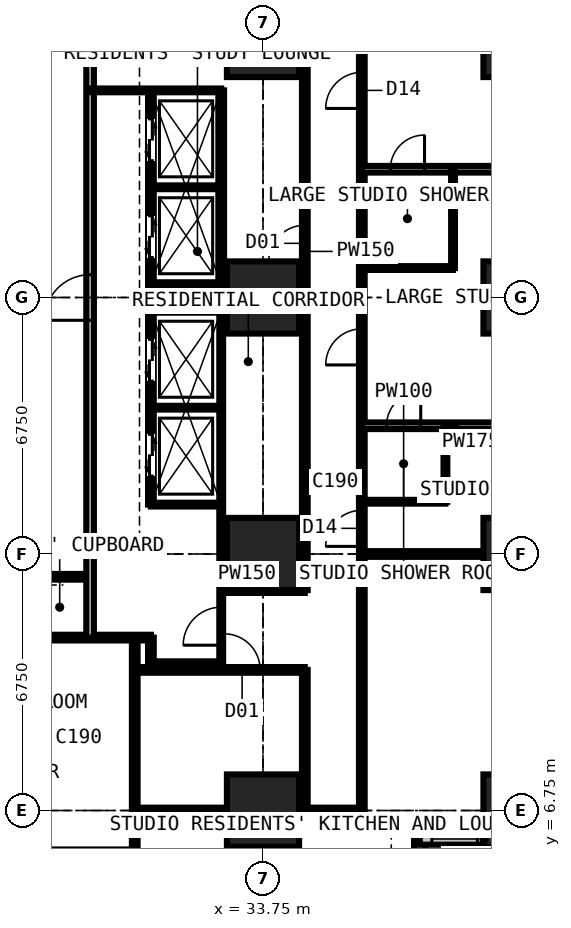
"""IFC4 building model, lengths in metres.
Left out: names, types, materials, properties, quantities, classifications, styles, units other than length and angle.
Written with IfcOpenShell. Run it as: python <this file> out.ifc"""

import sys

from ifc_helpers import new_model, si_unit, direction, frame, frame_2d, origin, origin_2d, place, context, subcontext, project, spatial, rectangle, extrude, element, fill, save


model = new_model("IFC4")
c1 = context("Model", 3, precision=1e-05, world=origin(), true_north=direction((0.0, 1.0)))
c2 = subcontext(c1, "Body", "Model", "MODEL_VIEW")
j1 = project(units=[si_unit("LENGTHUNIT", "METRE"), si_unit("PLANEANGLEUNIT", "RADIAN")], contexts=[c1])
p1 = place(None, origin())
s1 = spatial("IfcSite", under=j1, at=p1, CompositionType="ELEMENT")
p2 = place(p1, origin())
s2 = spatial("IfcBuilding", under=s1, at=p2, CompositionType="ELEMENT")
p3 = place(p2, frame((0.0, 0.0, 18.0)))
s3 = spatial("IfcBuildingStorey", under=s2, at=p3, CompositionType="ELEMENT", Elevation=18.0)
for number, where, z_axis, x_axis in (
    (1, (33.75, 6.75, 0.0), (0.0, 0.0, 1.0), (1.0, 0.0, 0.0)),
    (2, (33.75, 13.5, 0.0), (0.0, 0.0, 1.0), (1.0, 0.0, 0.0)),
    (3, (33.75, 20.25, 0.0), (0.0, 0.0, 1.0), (1.0, 0.0, 0.0)),
    (4, (33.75, 27.0, 0.0), (0.0, 0.0, 1.0), (1.0, 0.0, 0.0)),
    (5, (40.5, 6.75, 0.0), (0.0, 0.0, 1.0), (1.0, 0.0, 0.0)),
    (6, (40.5, 13.5, 0.0), (0.0, 0.0, 1.0), (1.0, 0.0, 0.0)),
    (7, (40.5, 20.25, 0.0), (0.0, 0.0, 1.0), (1.0, 0.0, 0.0)),
    (8, (40.5, 27.0, 0.0), (0.0, 0.0, 1.0), (1.0, 0.0, 0.0)),
):
    element("IfcColumn", number, at=place(p3, frame(where, z_axis=z_axis, x_axis=x_axis)), inside=s3, PredefinedType="COLUMN", context=c2, shape_type="SweptSolid", body=[
        extrude(rectangle(XDim=1.9, YDim=1.9, at=origin_2d()), origin(), (0.0, 0.0, 1.0), 3.6),
    ])
p4 = place(p3, frame((37.875, 2.625, 0.0), z_axis=(0.0, 0.0, 1.0), x_axis=(0.0, 1.0, 0.0)))
e9 = element("IfcWall", 9, at=p4, inside=s3, PredefinedType="SOLIDWALL", context=c2, shape_type="SweptSolid", body=[
    extrude(rectangle(XDim=3.375, YDim=0.3, at=frame_2d((1.688, 0.0))), origin(), (0.0, 0.0, 1.0), 3.375),
])
p5 = place(p4, frame((0.788, 0.0, 0.6)))
e10 = element("IfcOpeningElement", 10, at=p5, cuts=e9, PredefinedType="OPENING", context=c2, shape_type="SweptSolid", body=[
    extrude(rectangle(XDim=1.8, YDim=2.1, at=frame_2d((0.9, 1.05))), frame((0.0, 0.16, 0.0), z_axis=(0.0, -1.0, 0.0), x_axis=(1.0, 0.0, 0.0)), (0.0, 0.0, 1.0), 0.32),
])
p6 = place(p3, frame((37.875, 6.0, 0.0), z_axis=(0.0, 0.0, 1.0), x_axis=(1.0, 0.0, 0.0)))
e11 = element("IfcWall", 11, at=p6, inside=s3, PredefinedType="SOLIDWALL", context=c2, shape_type="SweptSolid", body=[
    extrude(rectangle(XDim=3.375, YDim=0.3, at=frame_2d((1.688, 0.0))), origin(), (0.0, 0.0, 1.0), 3.375),
])
p7 = place(p6, frame((0.317, 0.0, 0.9)))
e12 = element("IfcOpeningElement", 12, at=p7, cuts=e11, PredefinedType="OPENING", context=c2, shape_type="SweptSolid", body=[
    extrude(rectangle(XDim=1.2, YDim=1.8, at=frame_2d((0.6, 0.9))), frame((0.0, 0.16, 0.0), z_axis=(0.0, -1.0, 0.0), x_axis=(1.0, 0.0, 0.0)), (0.0, 0.0, 1.0), 0.32),
])
p8 = place(p3, frame((10.125, 11.3, 0.0), z_axis=(0.0, 0.0, 1.0), x_axis=(1.0, 0.0, 0.0)))
e13 = element("IfcWall", 13, at=p8, inside=s3, PredefinedType="PARTITIONING", context=c2, shape_type="SweptSolid", body=[
    extrude(rectangle(XDim=20.675, YDim=0.15, at=frame_2d((10.337, 0.0))), origin(), (0.0, 0.0, 1.0), 3.375),
])
p9 = place(p8, frame((8.375, 0.0, 0.0)))
e14 = element("IfcOpeningElement", 14, at=p9, cuts=e13, PredefinedType="OPENING", context=c2, shape_type="SweptSolid", body=[
    extrude(rectangle(XDim=1.0, YDim=2.2, at=frame_2d((0.5, 1.1))), frame((0.0, 0.085, 0.0), z_axis=(0.0, -1.0, 0.0), x_axis=(1.0, 0.0, 0.0)), (0.0, 0.0, 1.0), 0.17),
])
p10 = place(p8, frame((10.975, 0.0, 0.0)))
e15 = element("IfcOpeningElement", 15, at=p10, cuts=e13, PredefinedType="OPENING", context=c2, shape_type="SweptSolid", body=[
    extrude(rectangle(XDim=1.0, YDim=2.2, at=frame_2d((0.5, 1.1))), frame((0.0, 0.085, 0.0), z_axis=(0.0, -1.0, 0.0), x_axis=(1.0, 0.0, 0.0)), (0.0, 0.0, 1.0), 0.17),
])
p11 = place(p8, frame((3.925, 0.0, 0.0)))
e16 = element("IfcOpeningElement", 16, at=p11, cuts=e13, PredefinedType="OPENING", context=c2, shape_type="SweptSolid", body=[
    extrude(rectangle(XDim=0.95, YDim=2.2, at=frame_2d((0.475, 1.1))), frame((0.0, 0.085, 0.0), z_axis=(0.0, -1.0, 0.0), x_axis=(1.0, 0.0, 0.0)), (0.0, 0.0, 1.0), 0.17),
])
p12 = place(p3, frame((27.6, 12.9, 0.0), z_axis=(0.0, 0.0, 1.0), x_axis=(1.0, 0.0, 0.0)))
e17 = element("IfcWall", 17, at=p12, inside=s3, PredefinedType="PARTITIONING", context=c2, shape_type="SweptSolid", body=[
    extrude(rectangle(XDim=1.6, YDim=0.15, at=frame_2d((0.8, 0.0))), origin(), (0.0, 0.0, 1.0), 2.877),
])
p13 = place(p3, frame((29.2, 11.3, 0.0), z_axis=(0.0, 0.0, 1.0), x_axis=(0.0, 1.0, 0.0)))
e18 = element("IfcWall", 18, at=p13, inside=s3, PredefinedType="PARTITIONING", context=c2, shape_type="SweptSolid", body=[
    extrude(rectangle(XDim=17.9, YDim=0.2, at=frame_2d((8.95, 0.0))), origin(), (0.0, 0.0, 1.0), 3.375),
])
p14 = place(p13, frame((8.35, 0.0, 0.0)))
e19 = element("IfcOpeningElement", 19, at=p14, cuts=e18, PredefinedType="OPENING", context=c2, shape_type="SweptSolid", body=[
    extrude(rectangle(XDim=1.2, YDim=2.2, at=frame_2d((0.6, 1.1))), frame((0.0, 0.11, 0.0), z_axis=(0.0, -1.0, 0.0), x_axis=(1.0, 0.0, 0.0)), (0.0, 0.0, 1.0), 0.22),
])
p15 = place(p3, frame((29.2, 25.7, 0.0), z_axis=(0.0, 0.0, 1.0), x_axis=(1.0, 0.0, 0.0)))
e20 = element("IfcWall", 20, at=p15, inside=s3, PredefinedType="SHEAR", context=c2, shape_type="SweptSolid", body=[
    extrude(rectangle(XDim=3.45, YDim=0.1, at=frame_2d((1.725, 0.0))), origin(), (0.0, 0.0, 1.0), 3.375),
])
p16 = place(p3, frame((30.375, -0.734, 0.0), z_axis=(0.0, 0.0, 1.0), x_axis=(0.0, 1.0, 0.0)))
e21 = element("IfcWall", 21, at=p16, inside=s3, PredefinedType="PARTITIONING", context=c2, shape_type="SweptSolid", body=[
    extrude(rectangle(XDim=12.034, YDim=0.15, at=frame_2d((6.017, 0.0))), origin(), (0.0, 0.0, 1.0), 3.375),
])
p17 = place(p16, frame((5.134, 0.0, 0.0)))
e22 = element("IfcOpeningElement", 22, at=p17, cuts=e21, PredefinedType="OPENING", context=c2, shape_type="SweptSolid", body=[
    extrude(rectangle(XDim=1.0, YDim=2.2, at=frame_2d((0.5, 1.1))), frame((0.0, 0.085, 0.0), z_axis=(0.0, -1.0, 0.0), x_axis=(1.0, 0.0, 0.0)), (0.0, 0.0, 1.0), 0.17),
])
p18 = place(p3, frame((30.375, 6.75, 0.0), z_axis=(0.0, 0.0, 1.0), x_axis=(1.0, 0.0, 0.0)))
e23 = element("IfcWall", 23, at=p18, inside=s3, PredefinedType="PARTITIONING", context=c2, shape_type="SweptSolid", body=[
    extrude(rectangle(XDim=5.975, YDim=0.15, at=frame_2d((2.988, 0.0))), origin(), (0.0, 0.0, 1.0), 2.877),
])
p19 = place(p3, frame((30.375, 10.45, 0.0), z_axis=(0.0, 0.0, 1.0), x_axis=(1.0, 0.0, 0.0)))
e24 = element("IfcWall", 24, at=p19, inside=s3, PredefinedType="PARTITIONING", context=c2, shape_type="SweptSolid", body=[
    extrude(rectangle(XDim=4.475, YDim=0.15, at=frame_2d((2.238, 0.0))), origin(), (0.0, 0.0, 1.0), 3.375),
])
p20 = place(p19, frame((2.35, 0.0, 0.0)))
e25 = element("IfcOpeningElement", 25, at=p20, cuts=e24, PredefinedType="OPENING", context=c2, shape_type="SweptSolid", body=[
    extrude(rectangle(XDim=0.95, YDim=2.2, at=frame_2d((0.475, 1.1))), frame((0.0, 0.085, 0.0), z_axis=(0.0, -1.0, 0.0), x_axis=(1.0, 0.0, 0.0)), (0.0, 0.0, 1.0), 0.17),
])
p21 = place(p3, frame((30.8, 10.6, 0.0), z_axis=(0.0, 0.0, 1.0), x_axis=(0.0, 1.0, 0.0)))
e26 = element("IfcWall", 26, at=p21, inside=s3, PredefinedType="PARTITIONING", context=c2, shape_type="SweptSolid", body=[
    extrude(rectangle(XDim=0.7, YDim=0.15, at=frame_2d((0.35, 0.0))), origin(), (0.0, 0.0, 1.0), 3.375),
])
p22 = place(p3, frame((30.8, 10.6, 0.0), z_axis=(0.0, 0.0, 1.0), x_axis=(1.0, 0.0, 0.0)))
e27 = element("IfcWall", 27, at=p22, inside=s3, PredefinedType="PARTITIONING", context=c2, shape_type="SweptSolid", body=[
    extrude(rectangle(XDim=1.85, YDim=0.15, at=frame_2d((0.925, 0.0))), origin(), (0.0, 0.0, 1.0), 3.375),
])
p23 = place(p3, frame((30.8, 14.8, 0.0), z_axis=(0.0, 0.0, 1.0), x_axis=(0.0, 1.0, 0.0)))
e28 = element("IfcWall", 28, at=p23, inside=s3, PredefinedType="PARTITIONING", context=c2, shape_type="SweptSolid", body=[
    extrude(rectangle(XDim=10.9, YDim=0.15, at=frame_2d((5.45, 0.0))), origin(), (0.0, 0.0, 1.0), 3.375),
])
p24 = place(p23, frame((0.75, 0.0, 0.0)))
e29 = element("IfcOpeningElement", 29, at=p24, cuts=e28, PredefinedType="OPENING", context=c2, shape_type="SweptSolid", body=[
    extrude(rectangle(XDim=1.1, YDim=2.2, at=frame_2d((0.55, 1.1))), frame((0.0, 0.085, 0.0), z_axis=(0.0, -1.0, 0.0), x_axis=(1.0, 0.0, 0.0)), (0.0, 0.0, 1.0), 0.17),
])
p25 = place(p23, frame((3.25, 0.0, 0.0)))
e30 = element("IfcOpeningElement", 30, at=p25, cuts=e28, PredefinedType="OPENING", context=c2, shape_type="SweptSolid", body=[
    extrude(rectangle(XDim=1.1, YDim=2.2, at=frame_2d((0.55, 1.1))), frame((0.0, 0.085, 0.0), z_axis=(0.0, -1.0, 0.0), x_axis=(1.0, 0.0, 0.0)), (0.0, 0.0, 1.0), 0.17),
])
p26 = place(p23, frame((6.5, 0.0, 0.0)))
e31 = element("IfcOpeningElement", 31, at=p26, cuts=e28, PredefinedType="OPENING", context=c2, shape_type="SweptSolid", body=[
    extrude(rectangle(XDim=1.1, YDim=2.2, at=frame_2d((0.55, 1.1))), frame((0.0, 0.085, 0.0), z_axis=(0.0, -1.0, 0.0), x_axis=(1.0, 0.0, 0.0)), (0.0, 0.0, 1.0), 0.17),
])
p27 = place(p23, frame((9.05, 0.0, 0.0)))
e32 = element("IfcOpeningElement", 32, at=p27, cuts=e28, PredefinedType="OPENING", context=c2, shape_type="SweptSolid", body=[
    extrude(rectangle(XDim=1.1, YDim=2.2, at=frame_2d((0.55, 1.1))), frame((0.0, 0.085, 0.0), z_axis=(0.0, -1.0, 0.0), x_axis=(1.0, 0.0, 0.0)), (0.0, 0.0, 1.0), 0.17),
])
for number, where, z_axis, x_axis in (
    (33, (30.8, 14.8, 0.0), (0.0, 0.0, 1.0), (1.0, 0.0, 0.0)),
    (34, (30.8, 17.35, 0.0), (0.0, 0.0, 1.0), (1.0, 0.0, 0.0)),
    (35, (30.8, 19.9, 0.0), (0.0, 0.0, 1.0), (1.0, 0.0, 0.0)),
    (36, (30.8, 20.6, 0.0), (0.0, 0.0, 1.0), (1.0, 0.0, 0.0)),
    (37, (30.8, 23.15, 0.0), (0.0, 0.0, 1.0), (1.0, 0.0, 0.0)),
):
    element("IfcWall", number, at=place(p3, frame(where, z_axis=z_axis, x_axis=x_axis)), inside=s3, PredefinedType="SHEAR", context=c2, shape_type="SweptSolid", body=[
        extrude(rectangle(XDim=1.85, YDim=0.1, at=frame_2d((0.925, 0.0))), origin(), (0.0, 0.0, 1.0), 3.375),
    ])
p28 = place(p3, frame((32.65, 10.6, 0.0), z_axis=(0.0, 0.0, 1.0), x_axis=(0.0, 1.0, 0.0)))
e38 = element("IfcWall", 38, at=p28, inside=s3, PredefinedType="SHEAR", context=c2, shape_type="SweptSolid", body=[
    extrude(rectangle(XDim=9.3, YDim=0.1, at=frame_2d((4.65, 0.0))), origin(), (0.0, 0.0, 1.0), 3.375),
])
p29 = place(p28, frame((0.5, 0.0, 0.0)))
e39 = element("IfcOpeningElement", 39, at=p29, cuts=e38, PredefinedType="OPENING", context=c2, shape_type="SweptSolid", body=[
    extrude(rectangle(XDim=1.0, YDim=2.2, at=frame_2d((0.5, 1.1))), frame((0.0, 0.06, 0.0), z_axis=(0.0, -1.0, 0.0), x_axis=(1.0, 0.0, 0.0)), (0.0, 0.0, 1.0), 0.12),
])
p30 = place(p3, frame((32.65, 12.55, 0.0), z_axis=(0.0, 0.0, 1.0), x_axis=(1.0, 0.0, 0.0)))
e40 = element("IfcWall", 40, at=p30, inside=s3, PredefinedType="PARTITIONING", context=c2, shape_type="SweptSolid", body=[
    extrude(rectangle(XDim=2.2, YDim=0.15, at=frame_2d((1.1, 0.0))), origin(), (0.0, 0.0, 1.0), 3.375),
])
p31 = place(p3, frame((32.65, 20.6, 0.0), z_axis=(0.0, 0.0, 1.0), x_axis=(0.0, 1.0, 0.0)))
e41 = element("IfcWall", 41, at=p31, inside=s3, PredefinedType="PARTITIONING", context=c2, shape_type="SweptSolid", body=[
    extrude(rectangle(XDim=5.1, YDim=0.15, at=frame_2d((2.55, 0.0))), origin(), (0.0, 0.0, 1.0), 3.375),
])
p32 = place(p3, frame((34.85, 6.75, 0.0), z_axis=(0.0, 0.0, 1.0), x_axis=(0.0, 1.0, 0.0)))
e42 = element("IfcWall", 42, at=p32, inside=s3, PredefinedType="PARTITIONING", context=c2, shape_type="SweptSolid", body=[
    extrude(rectangle(XDim=3.7, YDim=0.15, at=frame_2d((1.85, 0.0))), origin(), (0.0, 0.0, 1.0), 3.375),
])
p33 = place(p3, frame((34.85, 12.55, 0.0), z_axis=(0.0, 0.0, 1.0), x_axis=(0.0, 1.0, 0.0)))
e43 = element("IfcWall", 43, at=p33, inside=s3, PredefinedType="PARTITIONING", context=c2, shape_type="SweptSolid", body=[
    extrude(rectangle(XDim=17.825, YDim=0.15, at=frame_2d((8.913, 0.0))), origin(), (0.0, 0.0, 1.0), 3.375),
])
p34 = place(p33, frame((8.65, 0.0, 0.0)))
e44 = element("IfcOpeningElement", 44, at=p34, cuts=e43, PredefinedType="OPENING", context=c2, shape_type="SweptSolid", body=[
    extrude(rectangle(XDim=0.95, YDim=2.2, at=frame_2d((0.475, 1.1))), frame((0.0, 0.085, 0.0), z_axis=(0.0, -1.0, 0.0), x_axis=(1.0, 0.0, 0.0)), (0.0, 0.0, 1.0), 0.17),
])
p35 = place(p3, frame((36.35, 6.75, 0.0), z_axis=(0.0, 0.0, 1.0), x_axis=(0.0, 1.0, 0.0)))
e45 = element("IfcWall", 45, at=p35, inside=s3, PredefinedType="PARTITIONING", context=c2, shape_type="SweptSolid", body=[
    extrude(rectangle(XDim=23.625, YDim=0.15, at=frame_2d((11.812, 0.0))), origin(), (0.0, 0.0, 1.0), 3.375),
])
p36 = place(p35, frame((18.475, 0.0, 0.0)))
e46 = element("IfcOpeningElement", 46, at=p36, cuts=e45, PredefinedType="OPENING", context=c2, shape_type="SweptSolid", body=[
    extrude(rectangle(XDim=0.95, YDim=2.2, at=frame_2d((0.475, 1.1))), frame((0.0, 0.085, 0.0), z_axis=(0.0, -1.0, 0.0), x_axis=(1.0, 0.0, 0.0)), (0.0, 0.0, 1.0), 0.17),
])
p37 = place(p35, frame((11.725, 0.0, 0.0)))
e47 = element("IfcOpeningElement", 47, at=p37, cuts=e45, PredefinedType="OPENING", context=c2, shape_type="SweptSolid", body=[
    extrude(rectangle(XDim=0.95, YDim=2.2, at=frame_2d((0.475, 1.1))), frame((0.0, 0.085, 0.0), z_axis=(0.0, -1.0, 0.0), x_axis=(1.0, 0.0, 0.0)), (0.0, 0.0, 1.0), 0.17),
])
p38 = place(p35, frame((6.95, 0.0, 0.0)))
e48 = element("IfcOpeningElement", 48, at=p38, cuts=e45, PredefinedType="OPENING", context=c2, shape_type="SweptSolid", body=[
    extrude(rectangle(XDim=0.95, YDim=2.2, at=frame_2d((0.475, 1.1))), frame((0.0, 0.085, 0.0), z_axis=(0.0, -1.0, 0.0), x_axis=(1.0, 0.0, 0.0)), (0.0, 0.0, 1.0), 0.17),
])
p39 = place(p3, frame((36.35, 13.5, 0.0), z_axis=(0.0, 0.0, 1.0), x_axis=(1.0, 0.0, 0.0)))
e49 = element("IfcWall", 49, at=p39, inside=s3, PredefinedType="PARTITIONING", context=c2, shape_type="SweptSolid", body=[
    extrude(rectangle(XDim=4.884, YDim=0.15, at=frame_2d((2.442, 0.0))), origin(), (0.0, 0.0, 1.0), 2.877),
])
p40 = place(p3, frame((36.35, 14.875, 0.0), z_axis=(0.0, 0.0, 1.0), x_axis=(1.0, 0.0, 0.0)))
e50 = element("IfcWall", 50, at=p40, inside=s3, PredefinedType="PARTITIONING", context=c2, shape_type="SweptSolid", body=[
    extrude(rectangle(XDim=2.2, YDim=0.1, at=frame_2d((1.1, 0.0))), origin(), (0.0, 0.0, 1.0), 3.375),
])
p41 = place(p3, frame((36.35, 16.875, 0.0), z_axis=(0.0, 0.0, 1.0), x_axis=(1.0, 0.0, 0.0)))
e51 = element("IfcWall", 51, at=p41, inside=s3, PredefinedType="PARTITIONING", context=c2, shape_type="SweptSolid", body=[
    extrude(rectangle(XDim=4.884, YDim=0.175, at=frame_2d((2.442, 0.0))), origin(), (0.0, 0.0, 1.0), 3.375),
])
p42 = place(p41, frame((0.65, 0.0, 0.0)))
e52 = element("IfcOpeningElement", 52, at=p42, cuts=e51, PredefinedType="OPENING", context=c2, shape_type="SweptSolid", body=[
    extrude(rectangle(XDim=0.9, YDim=2.2, at=frame_2d((0.45, 1.1))), frame((0.0, 0.097, 0.0), z_axis=(0.0, -1.0, 0.0), x_axis=(1.0, 0.0, 0.0)), (0.0, 0.0, 1.0), 0.195),
])
p43 = place(p3, frame((36.35, 21.025, 0.0), z_axis=(0.0, 0.0, 1.0), x_axis=(1.0, 0.0, 0.0)))
e53 = element("IfcWall", 53, at=p43, inside=s3, PredefinedType="PARTITIONING", context=c2, shape_type="SweptSolid", body=[
    extrude(rectangle(XDim=2.4, YDim=0.1, at=frame_2d((1.2, 0.0))), origin(), (0.0, 0.0, 1.0), 3.375),
])
p44 = place(p3, frame((36.35, 23.625, 0.0), z_axis=(0.0, 0.0, 1.0), x_axis=(1.0, 0.0, 0.0)))
e54 = element("IfcWall", 54, at=p44, inside=s3, PredefinedType="PARTITIONING", context=c2, shape_type="SweptSolid", body=[
    extrude(rectangle(XDim=4.884, YDim=0.175, at=frame_2d((2.442, 0.0))), origin(), (0.0, 0.0, 1.0), 3.375),
])
p45 = place(p44, frame((0.75, 0.0, 0.0)))
e55 = element("IfcOpeningElement", 55, at=p45, cuts=e54, PredefinedType="OPENING", context=c2, shape_type="SweptSolid", body=[
    extrude(rectangle(XDim=0.9, YDim=2.2, at=frame_2d((0.45, 1.1))), frame((0.0, 0.097, 0.0), z_axis=(0.0, -1.0, 0.0), x_axis=(1.0, 0.0, 0.0)), (0.0, 0.0, 1.0), 0.195),
])
p46 = place(p3, frame((38.55, 14.875, 0.0), z_axis=(0.0, 0.0, 1.0), x_axis=(0.0, 1.0, 0.0)))
e56 = element("IfcWall", 56, at=p46, inside=s3, PredefinedType="PARTITIONING", context=c2, shape_type="SweptSolid", body=[
    extrude(rectangle(XDim=2.0, YDim=0.1, at=frame_2d((1.0, 0.0))), origin(), (0.0, 0.0, 1.0), 3.375),
])
p47 = place(p3, frame((38.75, 21.025, 0.0), z_axis=(0.0, 0.0, 1.0), x_axis=(0.0, 1.0, 0.0)))
e57 = element("IfcWall", 57, at=p47, inside=s3, PredefinedType="PARTITIONING", context=c2, shape_type="SweptSolid", body=[
    extrude(rectangle(XDim=2.6, YDim=0.1, at=frame_2d((1.3, 0.0))), origin(), (0.0, 0.0, 1.0), 3.375),
])
p48 = place(p7, origin())
e58 = element("IfcWindow", 58, at=p48, inside=s3, PartitioningType="SINGLE_PANEL", PredefinedType="WINDOW", context=c2, shape_type="SweptSolid", body=[
    extrude(rectangle(XDim=1.2, YDim=1.8, at=frame_2d((0.6, 0.9))), frame((0.0, 0.03, 0.0), z_axis=(0.0, -1.0, 0.0), x_axis=(1.0, 0.0, 0.0)), (0.0, 0.0, 1.0), 0.06),
])
fill(e12, e58)
p49 = place(p36, origin())
e59 = element("IfcDoor", 59, at=p49, inside=s3, OperationType="SINGLE_SWING_LEFT", PredefinedType="DOOR", context=c2, shape_type="SweptSolid", body=[
    extrude(rectangle(XDim=0.95, YDim=2.2, at=frame_2d((0.475, 1.1))), frame((0.0, 0.025, 0.0), z_axis=(0.0, -1.0, 0.0), x_axis=(1.0, 0.0, 0.0)), (0.0, 0.0, 1.0), 0.05),
])
fill(e46, e59)
p50 = place(p37, origin())
e60 = element("IfcDoor", 60, at=p50, inside=s3, OperationType="SINGLE_SWING_LEFT", PredefinedType="DOOR", context=c2, shape_type="SweptSolid", body=[
    extrude(rectangle(XDim=0.95, YDim=2.2, at=frame_2d((0.475, 1.1))), frame((0.0, 0.025, 0.0), z_axis=(0.0, -1.0, 0.0), x_axis=(1.0, 0.0, 0.0)), (0.0, 0.0, 1.0), 0.05),
])
fill(e47, e60)
p51 = place(p45, origin())
e61 = element("IfcDoor", 61, at=p51, inside=s3, OperationType="SINGLE_SWING_RIGHT", PredefinedType="DOOR", context=c2, shape_type="SweptSolid", body=[
    extrude(rectangle(XDim=0.9, YDim=2.2, at=frame_2d((0.45, 1.1))), frame((0.0, 0.025, 0.0), z_axis=(0.0, -1.0, 0.0), x_axis=(1.0, 0.0, 0.0)), (0.0, 0.0, 1.0), 0.05),
])
fill(e55, e61)
p52 = place(p38, origin())
e62 = element("IfcDoor", 62, at=p52, inside=s3, OperationType="SINGLE_SWING_LEFT", PredefinedType="DOOR", context=c2, shape_type="SweptSolid", body=[
    extrude(rectangle(XDim=0.95, YDim=2.2, at=frame_2d((0.475, 1.1))), frame((0.0, 0.025, 0.0), z_axis=(0.0, -1.0, 0.0), x_axis=(1.0, 0.0, 0.0)), (0.0, 0.0, 1.0), 0.05),
])
fill(e48, e62)
p53 = place(p42, origin())
e63 = element("IfcDoor", 63, at=p53, inside=s3, OperationType="SINGLE_SWING_RIGHT", PredefinedType="DOOR", context=c2, shape_type="SweptSolid", body=[
    extrude(rectangle(XDim=0.9, YDim=2.2, at=frame_2d((0.45, 1.1))), frame((0.0, 0.025, 0.0), z_axis=(0.0, -1.0, 0.0), x_axis=(1.0, 0.0, 0.0)), (0.0, 0.0, 1.0), 0.05),
])
fill(e52, e63)
p54 = place(p29, origin())
e64 = element("IfcDoor", 64, at=p54, inside=s3, OperationType="SINGLE_SWING_LEFT", PredefinedType="DOOR", context=c2, shape_type="SweptSolid", body=[
    extrude(rectangle(XDim=1.0, YDim=2.2, at=frame_2d((0.5, 1.1))), frame((0.0, 0.025, 0.0), z_axis=(0.0, -1.0, 0.0), x_axis=(1.0, 0.0, 0.0)), (0.0, 0.0, 1.0), 0.05),
])
fill(e39, e64)
p55 = place(p34, origin())
e65 = element("IfcDoor", 65, at=p55, inside=s3, OperationType="SINGLE_SWING_LEFT", PredefinedType="DOOR", context=c2, shape_type="SweptSolid", body=[
    extrude(rectangle(XDim=0.95, YDim=2.2, at=frame_2d((0.475, 1.1))), frame((0.0, 0.025, 0.0), z_axis=(0.0, -1.0, 0.0), x_axis=(1.0, 0.0, 0.0)), (0.0, 0.0, 1.0), 0.05),
])
fill(e44, e65)
p56 = place(p20, origin())
e66 = element("IfcDoor", 66, at=p56, inside=s3, OperationType="SINGLE_SWING_LEFT", PredefinedType="DOOR", context=c2, shape_type="SweptSolid", body=[
    extrude(rectangle(XDim=0.95, YDim=2.2, at=frame_2d((0.475, 1.1))), frame((0.0, 0.025, 0.0), z_axis=(0.0, -1.0, 0.0), x_axis=(1.0, 0.0, 0.0)), (0.0, 0.0, 1.0), 0.05),
])
fill(e25, e66)
p57 = place(p24, origin())
e67 = element("IfcDoor", 67, at=p57, inside=s3, OperationType="DOUBLE_DOOR_SLIDING", PredefinedType="DOOR", context=c2, shape_type="SweptSolid", body=[
    extrude(rectangle(XDim=1.1, YDim=2.2, at=frame_2d((0.55, 1.1))), frame((0.0, 0.025, 0.0), z_axis=(0.0, -1.0, 0.0), x_axis=(1.0, 0.0, 0.0)), (0.0, 0.0, 1.0), 0.05),
])
fill(e29, e67)
p58 = place(p25, origin())
e68 = element("IfcDoor", 68, at=p58, inside=s3, OperationType="DOUBLE_DOOR_SLIDING", PredefinedType="DOOR", context=c2, shape_type="SweptSolid", body=[
    extrude(rectangle(XDim=1.1, YDim=2.2, at=frame_2d((0.55, 1.1))), frame((0.0, 0.025, 0.0), z_axis=(0.0, -1.0, 0.0), x_axis=(1.0, 0.0, 0.0)), (0.0, 0.0, 1.0), 0.05),
])
fill(e30, e68)
p59 = place(p26, origin())
e69 = element("IfcDoor", 69, at=p59, inside=s3, OperationType="DOUBLE_DOOR_SLIDING", PredefinedType="DOOR", context=c2, shape_type="SweptSolid", body=[
    extrude(rectangle(XDim=1.1, YDim=2.2, at=frame_2d((0.55, 1.1))), frame((0.0, 0.025, 0.0), z_axis=(0.0, -1.0, 0.0), x_axis=(1.0, 0.0, 0.0)), (0.0, 0.0, 1.0), 0.05),
])
fill(e31, e69)
p60 = place(p27, origin())
e70 = element("IfcDoor", 70, at=p60, inside=s3, OperationType="DOUBLE_DOOR_SLIDING", PredefinedType="DOOR", context=c2, shape_type="SweptSolid", body=[
    extrude(rectangle(XDim=1.1, YDim=2.2, at=frame_2d((0.55, 1.1))), frame((0.0, 0.025, 0.0), z_axis=(0.0, -1.0, 0.0), x_axis=(1.0, 0.0, 0.0)), (0.0, 0.0, 1.0), 0.05),
])
fill(e32, e70)
p61 = place(p14, origin())
e71 = element("IfcDoor", 71, at=p61, inside=s3, OperationType="DOUBLE_DOOR_SINGLE_SWING", PredefinedType="DOOR", context=c2, shape_type="SweptSolid", body=[
    extrude(rectangle(XDim=1.2, YDim=2.2, at=frame_2d((0.6, 1.1))), frame((0.0, 0.025, 0.0), z_axis=(0.0, -1.0, 0.0), x_axis=(1.0, 0.0, 0.0)), (0.0, 0.0, 1.0), 0.05),
])
fill(e19, e71)
save(model, sys.argv[1])
